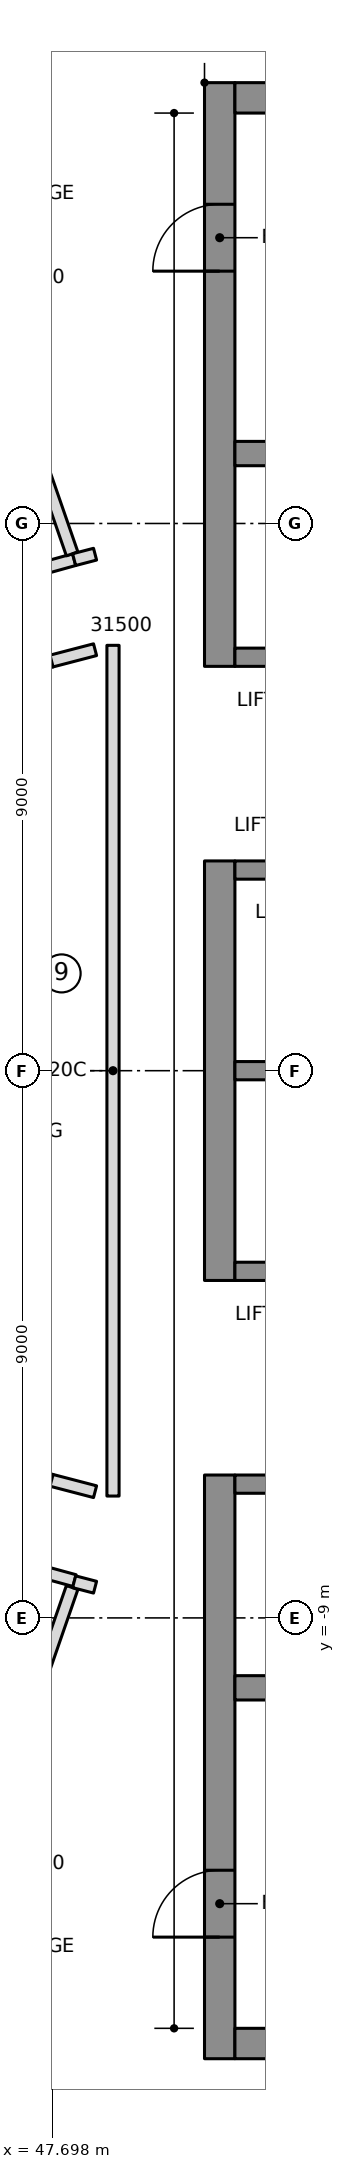
"""IFC4 building model, lengths in metres.
Left out: names, types, materials, properties, quantities, classifications, styles, units other than length and angle.
Written with IfcOpenShell. Run it as: python <this file> out.ifc"""

import sys

from ifc_helpers import new_model, si_unit, direction, frame, frame_2d, origin, place, context, subcontext, project, spatial, rectangle, extrude, element, fill, save


model = new_model("IFC4")
c1 = context("Model", 3, precision=1e-05, world=origin(), true_north=direction((0.0, 1.0)))
c2 = subcontext(c1, "Body", "Model", "MODEL_VIEW")
j1 = project(units=[si_unit("LENGTHUNIT", "METRE"), si_unit("PLANEANGLEUNIT", "RADIAN")], contexts=[c1])
p1 = place(None, origin())
s1 = spatial("IfcSite", under=j1, at=p1, CompositionType="ELEMENT")
p2 = place(p1, origin())
s2 = spatial("IfcBuilding", under=s1, at=p2, CompositionType="ELEMENT")
p3 = place(p2, frame((0.0, 0.0, 263.3)))
s3 = spatial("IfcBuildingStorey", under=s2, at=p3, CompositionType="ELEMENT", Elevation=263.3)
p4 = place(p3, frame((50.45, 6.65, 0.0), z_axis=(0.0, 0.0, 1.0), x_axis=(0.0, 1.0, 0.0)))
e1 = element("IfcWall", 1, at=p4, inside=s3, PredefinedType="SHEAR", context=c2, shape_type="SweptSolid", body=[
    extrude(rectangle(XDim=9.6, YDim=0.5, at=frame_2d((4.8, 0.0))), origin(), (0.0, 0.0, 1.0), 4.6),
])
p5 = place(p4, frame((6.5, 0.0, 0.0)))
e2 = element("IfcOpeningElement", 2, at=p5, cuts=e1, PredefinedType="OPENING", context=c2, shape_type="SweptSolid", body=[
    extrude(rectangle(XDim=1.1, YDim=2.1, at=frame_2d((0.55, 1.05))), frame((0.0, 0.26, 0.0), z_axis=(0.0, -1.0, 0.0), x_axis=(1.0, 0.0, 0.0)), (0.0, 0.0, 1.0), 0.52),
])
p6 = place(p3, frame((50.45, -3.45, 0.0), z_axis=(0.0, 0.0, 1.0), x_axis=(0.0, 1.0, 0.0)))
e3 = element("IfcWall", 3, at=p6, inside=s3, PredefinedType="SHEAR", context=c2, shape_type="SweptSolid", body=[
    extrude(rectangle(XDim=6.9, YDim=0.5, at=frame_2d((3.45, 0.0))), origin(), (0.0, 0.0, 1.0), 4.6),
])
p7 = place(p3, frame((50.45, -16.25, 0.0), z_axis=(0.0, 0.0, 1.0), x_axis=(0.0, 1.0, 0.0)))
e4 = element("IfcWall", 4, at=p7, inside=s3, PredefinedType="SHEAR", context=c2, shape_type="SweptSolid", body=[
    extrude(rectangle(XDim=9.6, YDim=0.5, at=frame_2d((4.8, 0.0))), origin(), (0.0, 0.0, 1.0), 4.6),
])
p8 = place(p7, frame((2.0, 0.0, 0.0)))
e5 = element("IfcOpeningElement", 5, at=p8, cuts=e4, PredefinedType="OPENING", context=c2, shape_type="SweptSolid", body=[
    extrude(rectangle(XDim=1.1, YDim=2.1, at=frame_2d((0.55, 1.05))), frame((0.0, 0.26, 0.0), z_axis=(0.0, -1.0, 0.0), x_axis=(1.0, 0.0, 0.0)), (0.0, 0.0, 1.0), 0.52),
])
for number, where, z_axis, x_axis in (
    (6, (50.7, 16.0, 0.0), (0.0, 0.0, 1.0), (1.0, 0.0, 0.0)),
    (7, (50.7, -16.0, 0.0), (0.0, 0.0, 1.0), (1.0, 0.0, 0.0)),
):
    element("IfcWall", number, at=place(p3, frame(where, z_axis=z_axis, x_axis=x_axis)), inside=s3, PredefinedType="SHEAR", context=c2, shape_type="SweptSolid", body=[
        extrude(rectangle(XDim=13.52, YDim=0.5, at=frame_2d((6.76, 0.0))), origin(), (0.0, 0.0, 1.0), 4.6),
    ])
p9 = place(p3, frame((50.7, 10.15, 0.0), z_axis=(0.0, 0.0, 1.0), x_axis=(1.0, 0.0, 0.0)))
e8 = element("IfcWall", 8, at=p9, inside=s3, PredefinedType="SHEAR", context=c2, shape_type="SweptSolid", body=[
    extrude(rectangle(XDim=13.02, YDim=0.4, at=frame_2d((6.51, 0.0))), origin(), (0.0, 0.0, 1.0), 4.6),
])
p10 = place(p9, frame((0.7, 0.0, 0.0)))
e9 = element("IfcOpeningElement", 9, at=p10, cuts=e8, PredefinedType="OPENING", context=c2, shape_type="SweptSolid", body=[
    extrude(rectangle(XDim=1.1, YDim=2.1, at=frame_2d((0.55, 1.05))), frame((0.0, 0.21, 0.0), z_axis=(0.0, -1.0, 0.0), x_axis=(1.0, 0.0, 0.0)), (0.0, 0.0, 1.0), 0.42),
])
p11 = place(p9, frame((3.5, 0.0, 0.0)))
e10 = element("IfcOpeningElement", 10, at=p11, cuts=e8, PredefinedType="OPENING", context=c2, shape_type="SweptSolid", body=[
    extrude(rectangle(XDim=1.1, YDim=2.1, at=frame_2d((0.55, 1.05))), frame((0.0, 0.21, 0.0), z_axis=(0.0, -1.0, 0.0), x_axis=(1.0, 0.0, 0.0)), (0.0, 0.0, 1.0), 0.42),
])
p12 = place(p3, frame((50.7, -10.15, 0.0), z_axis=(0.0, 0.0, 1.0), x_axis=(1.0, 0.0, 0.0)))
e11 = element("IfcWall", 11, at=p12, inside=s3, PredefinedType="SHEAR", context=c2, shape_type="SweptSolid", body=[
    extrude(rectangle(XDim=13.02, YDim=0.4, at=frame_2d((6.51, 0.0))), origin(), (0.0, 0.0, 1.0), 4.6),
])
p13 = place(p3, frame((50.7, 0.0, 0.0), z_axis=(0.0, 0.0, 1.0), x_axis=(1.0, 0.0, 0.0)))
e12 = element("IfcWall", 12, at=p13, inside=s3, PredefinedType="SHEAR", context=c2, shape_type="SweptSolid", body=[
    extrude(rectangle(XDim=10.9, YDim=0.3, at=frame_2d((5.45, 0.0))), origin(), (0.0, 0.0, 1.0), 4.6),
])
p14 = place(p3, frame((50.7, 3.3, 0.0), z_axis=(0.0, 0.0, 1.0), x_axis=(1.0, 0.0, 0.0)))
e13 = element("IfcWall", 13, at=p14, inside=s3, PredefinedType="SHEAR", context=c2, shape_type="SweptSolid", body=[
    extrude(rectangle(XDim=10.9, YDim=0.3, at=frame_2d((5.45, 0.0))), origin(), (0.0, 0.0, 1.0), 4.6),
])
p15 = place(p14, frame((0.7, 0.0, 0.0)))
e14 = element("IfcOpeningElement", 14, at=p15, cuts=e13, PredefinedType="OPENING", context=c2, shape_type="SweptSolid", body=[
    extrude(rectangle(XDim=1.1, YDim=2.1, at=frame_2d((0.55, 1.05))), frame((0.0, 0.16, 0.0), z_axis=(0.0, -1.0, 0.0), x_axis=(1.0, 0.0, 0.0)), (0.0, 0.0, 1.0), 0.32),
])
p16 = place(p14, frame((3.5, 0.0, 0.0)))
e15 = element("IfcOpeningElement", 15, at=p16, cuts=e13, PredefinedType="OPENING", context=c2, shape_type="SweptSolid", body=[
    extrude(rectangle(XDim=1.1, YDim=2.1, at=frame_2d((0.55, 1.05))), frame((0.0, 0.16, 0.0), z_axis=(0.0, -1.0, 0.0), x_axis=(1.0, 0.0, 0.0)), (0.0, 0.0, 1.0), 0.32),
])
p17 = place(p14, frame((6.4, 0.0, 0.0)))
e16 = element("IfcOpeningElement", 16, at=p17, cuts=e13, PredefinedType="OPENING", context=c2, shape_type="SweptSolid", body=[
    extrude(rectangle(XDim=0.9, YDim=2.1, at=frame_2d((0.45, 1.05))), frame((0.0, 0.16, 0.0), z_axis=(0.0, -1.0, 0.0), x_axis=(1.0, 0.0, 0.0)), (0.0, 0.0, 1.0), 0.32),
])
p18 = place(p14, frame((9.2, 0.0, 0.0)))
e17 = element("IfcOpeningElement", 17, at=p18, cuts=e13, PredefinedType="OPENING", context=c2, shape_type="SweptSolid", body=[
    extrude(rectangle(XDim=0.9, YDim=2.1, at=frame_2d((0.45, 1.05))), frame((0.0, 0.16, 0.0), z_axis=(0.0, -1.0, 0.0), x_axis=(1.0, 0.0, 0.0)), (0.0, 0.0, 1.0), 0.32),
])
p19 = place(p3, frame((50.7, 6.8, 0.0), z_axis=(0.0, 0.0, 1.0), x_axis=(1.0, 0.0, 0.0)))
e18 = element("IfcWall", 18, at=p19, inside=s3, PredefinedType="SHEAR", context=c2, shape_type="SweptSolid", body=[
    extrude(rectangle(XDim=10.9, YDim=0.3, at=frame_2d((5.45, 0.0))), origin(), (0.0, 0.0, 1.0), 4.6),
])
p20 = place(p19, frame((6.4, 0.0, 0.0)))
e19 = element("IfcOpeningElement", 19, at=p20, cuts=e18, PredefinedType="OPENING", context=c2, shape_type="SweptSolid", body=[
    extrude(rectangle(XDim=0.9, YDim=2.1, at=frame_2d((0.45, 1.05))), frame((0.0, 0.16, 0.0), z_axis=(0.0, -1.0, 0.0), x_axis=(1.0, 0.0, 0.0)), (0.0, 0.0, 1.0), 0.32),
])
p21 = place(p19, frame((9.2, 0.0, 0.0)))
e20 = element("IfcOpeningElement", 20, at=p21, cuts=e18, PredefinedType="OPENING", context=c2, shape_type="SweptSolid", body=[
    extrude(rectangle(XDim=0.9, YDim=2.1, at=frame_2d((0.45, 1.05))), frame((0.0, 0.16, 0.0), z_axis=(0.0, -1.0, 0.0), x_axis=(1.0, 0.0, 0.0)), (0.0, 0.0, 1.0), 0.32),
])
p22 = place(p3, frame((50.7, -3.3, 0.0), z_axis=(0.0, 0.0, 1.0), x_axis=(1.0, 0.0, 0.0)))
e21 = element("IfcWall", 21, at=p22, inside=s3, PredefinedType="SHEAR", context=c2, shape_type="SweptSolid", body=[
    extrude(rectangle(XDim=10.9, YDim=0.3, at=frame_2d((5.45, 0.0))), origin(), (0.0, 0.0, 1.0), 4.6),
])
p23 = place(p22, frame((9.1, 0.0, 0.0)))
e22 = element("IfcOpeningElement", 22, at=p23, cuts=e21, PredefinedType="OPENING", context=c2, shape_type="SweptSolid", body=[
    extrude(rectangle(XDim=1.1, YDim=2.1, at=frame_2d((0.55, 1.05))), frame((0.0, 0.16, 0.0), z_axis=(0.0, -1.0, 0.0), x_axis=(1.0, 0.0, 0.0)), (0.0, 0.0, 1.0), 0.32),
])
p24 = place(p3, frame((50.7, -6.8, 0.0), z_axis=(0.0, 0.0, 1.0), x_axis=(1.0, 0.0, 0.0)))
e23 = element("IfcWall", 23, at=p24, inside=s3, PredefinedType="SHEAR", context=c2, shape_type="SweptSolid", body=[
    extrude(rectangle(XDim=10.9, YDim=0.3, at=frame_2d((5.45, 0.0))), origin(), (0.0, 0.0, 1.0), 4.6),
])
p25 = place(p24, frame((6.3, 0.0, 0.0)))
e24 = element("IfcOpeningElement", 24, at=p25, cuts=e23, PredefinedType="OPENING", context=c2, shape_type="SweptSolid", body=[
    extrude(rectangle(XDim=1.1, YDim=2.1, at=frame_2d((0.55, 1.05))), frame((0.0, 0.16, 0.0), z_axis=(0.0, -1.0, 0.0), x_axis=(1.0, 0.0, 0.0)), (0.0, 0.0, 1.0), 0.32),
])
p26 = place(p24, frame((9.1, 0.0, 0.0)))
e25 = element("IfcOpeningElement", 25, at=p26, cuts=e23, PredefinedType="OPENING", context=c2, shape_type="SweptSolid", body=[
    extrude(rectangle(XDim=1.1, YDim=2.1, at=frame_2d((0.55, 1.05))), frame((0.0, 0.16, 0.0), z_axis=(0.0, -1.0, 0.0), x_axis=(1.0, 0.0, 0.0)), (0.0, 0.0, 1.0), 0.32),
])
p27 = place(p24, frame((0.8, 0.0, 0.0)))
e26 = element("IfcOpeningElement", 26, at=p27, cuts=e23, PredefinedType="OPENING", context=c2, shape_type="SweptSolid", body=[
    extrude(rectangle(XDim=0.9, YDim=2.1, at=frame_2d((0.45, 1.05))), frame((0.0, 0.16, 0.0), z_axis=(0.0, -1.0, 0.0), x_axis=(1.0, 0.0, 0.0)), (0.0, 0.0, 1.0), 0.32),
])
p28 = place(p24, frame((3.6, 0.0, 0.0)))
e27 = element("IfcOpeningElement", 27, at=p28, cuts=e23, PredefinedType="OPENING", context=c2, shape_type="SweptSolid", body=[
    extrude(rectangle(XDim=0.9, YDim=2.1, at=frame_2d((0.45, 1.05))), frame((0.0, 0.16, 0.0), z_axis=(0.0, -1.0, 0.0), x_axis=(1.0, 0.0, 0.0)), (0.0, 0.0, 1.0), 0.32),
])
p29 = place(p3, frame((48.056, 8.405, 0.0), z_axis=(0.0, 0.0, 1.0), x_axis=(-0.963429942227, -0.267960344866, 0.0)))
e28 = element("IfcWall", 28, at=p29, inside=s3, PredefinedType="PARTITIONING", context=c2, shape_type="SweptSolid", body=[
    extrude(rectangle(XDim=4.177, YDim=0.2, at=frame_2d((2.089, 0.0))), origin(), (0.0, 0.0, 1.0), 4.3),
])
p30 = place(p29, frame((1.35, 0.0, 0.0)))
e29 = element("IfcOpeningElement", 29, at=p30, cuts=e28, PredefinedType="OPENING", context=c2, shape_type="SweptSolid", body=[
    extrude(rectangle(XDim=1.0, YDim=2.1, at=frame_2d((0.5, 1.05))), frame((0.0, 0.11, 0.0), z_axis=(0.0, -1.0, 0.0), x_axis=(1.0, 0.0, 0.0)), (0.0, 0.0, 1.0), 0.22),
])
p31 = place(p3, frame((48.023, 8.5, 0.0), z_axis=(0.0, 0.0, 1.0), x_axis=(-0.327705598625, 0.944779890043, 0.0)))
e30 = element("IfcWall", 30, at=p31, inside=s3, PredefinedType="PARTITIONING", context=c2, shape_type="SweptSolid", body=[
    extrude(rectangle(XDim=9.61, YDim=0.2, at=frame_2d((4.805, 0.0))), origin(), (0.0, 0.0, 1.0), 4.3),
])
p32 = place(p3, frame((44.031, -7.286, 0.0), z_axis=(0.0, 0.0, 1.0), x_axis=(0.964708521199, -0.263320088726, 0.0)))
e31 = element("IfcWall", 31, at=p32, inside=s3, PredefinedType="PARTITIONING", context=c2, shape_type="SweptSolid", body=[
    extrude(rectangle(XDim=4.179, YDim=0.2, at=frame_2d((2.089, 0.0))), origin(), (0.0, 0.0, 1.0), 4.3),
])
p33 = place(p32, frame((1.8, 0.0, 0.0)))
e32 = element("IfcOpeningElement", 32, at=p33, cuts=e31, PredefinedType="OPENING", context=c2, shape_type="SweptSolid", body=[
    extrude(rectangle(XDim=1.0, YDim=2.1, at=frame_2d((0.5, 1.05))), frame((0.0, 0.11, 0.0), z_axis=(0.0, -1.0, 0.0), x_axis=(1.0, 0.0, 0.0)), (0.0, 0.0, 1.0), 0.22),
])
p34 = place(p3, frame((44.874, -17.579, 0.0), z_axis=(0.0, 0.0, 1.0), x_axis=(0.327705598625, 0.944779890043, 0.0)))
e33 = element("IfcWall", 33, at=p34, inside=s3, PredefinedType="PARTITIONING", context=c2, shape_type="SweptSolid", body=[
    extrude(rectangle(XDim=9.61, YDim=0.2, at=frame_2d((4.805, 0.0))), origin(), (0.0, 0.0, 1.0), 4.3),
])
p35 = place(p3, frame((47.684, -6.738, 0.0), z_axis=(0.0, 0.0, 1.0), x_axis=(-0.962403613575, 0.271623424206, 0.0)))
e34 = element("IfcWall", 34, at=p35, inside=s3, PredefinedType="PARTITIONING", context=c2, shape_type="SweptSolid", body=[
    extrude(rectangle(XDim=3.374, YDim=0.2, at=frame_2d((1.687, 0.0))), origin(), (0.0, 0.0, 1.0), 4.3),
])
p36 = place(p35, frame((1.187, 0.0, 0.0)))
e35 = element("IfcOpeningElement", 35, at=p36, cuts=e34, PredefinedType="OPENING", context=c2, shape_type="SweptSolid", body=[
    extrude(rectangle(XDim=1.0, YDim=2.1, at=frame_2d((0.5, 1.05))), frame((0.0, 0.11, 0.0), z_axis=(0.0, -1.0, 0.0), x_axis=(1.0, 0.0, 0.0)), (0.0, 0.0, 1.0), 0.22),
])
p37 = place(p3, frame((44.437, 5.821, 0.0), z_axis=(0.0, 0.0, 1.0), x_axis=(0.962403613575, 0.271623424206, 0.0)))
e36 = element("IfcWall", 36, at=p37, inside=s3, PredefinedType="PARTITIONING", context=c2, shape_type="SweptSolid", body=[
    extrude(rectangle(XDim=3.374, YDim=0.2, at=frame_2d((1.687, 0.0))), origin(), (0.0, 0.0, 1.0), 4.3),
])
for number, where, z_axis, x_axis in (
    (37, (48.4, 8.495, 0.0), (0.0, 0.0, 1.0), (-0.968, -0.253, 0.0)),
    (38, (48.056, -8.405, 0.0), (0.0, 0.0, 1.0), (0.968, -0.253, 0.0)),
):
    element("IfcWall", number, at=place(p3, frame(where, z_axis=z_axis, x_axis=x_axis)), inside=s3, PredefinedType="PARTITIONING", context=c2, shape_type="SweptSolid", body=[
        extrude(rectangle(XDim=0.355, YDim=0.2, at=frame_2d((0.178, 0.0))), origin(), (0.0, 0.0, 1.0), 4.3),
    ])
for number, where, z_axis, x_axis in (
    (39, (47.684, 6.738, 0.0), (0.0, 0.0, 1.0), (0.968, 0.253, 0.0)),
    (40, (48.4, -6.924, 0.0), (0.0, 0.0, 1.0), (-0.968, 0.253, 0.0)),
):
    element("IfcWall", number, at=place(p3, frame(where, z_axis=z_axis, x_axis=x_axis)), inside=s3, PredefinedType="PARTITIONING", context=c2, shape_type="SweptSolid", body=[
        extrude(rectangle(XDim=0.74, YDim=0.2, at=frame_2d((0.37, 0.0))), origin(), (0.0, 0.0, 1.0), 4.3),
    ])
p38 = place(p3, frame((48.695, 6.996, 0.0), z_axis=(0.0, 0.0, 1.0), x_axis=(0.0, -1.0, 0.0)))
e41 = element("IfcWall", 41, at=p38, inside=s3, PredefinedType="PARTITIONING", context=c2, shape_type="SweptSolid", body=[
    extrude(rectangle(XDim=13.992, YDim=0.2, at=frame_2d((6.996, 0.0))), origin(), (0.0, 0.0, 1.0), 4.3),
])
p39 = place(p5, origin())
e42 = element("IfcDoor", 42, at=p39, inside=s3, OperationType="SINGLE_SWING_RIGHT", PredefinedType="DOOR", context=c2, shape_type="SweptSolid", body=[
    extrude(rectangle(XDim=1.1, YDim=2.1, at=frame_2d((0.55, 1.05))), frame((0.0, 0.025, 0.0), z_axis=(0.0, -1.0, 0.0), x_axis=(1.0, 0.0, 0.0)), (0.0, 0.0, 1.0), 0.05),
])
fill(e2, e42)
p40 = place(p8, origin())
e43 = element("IfcDoor", 43, at=p40, inside=s3, OperationType="SINGLE_SWING_RIGHT", PredefinedType="DOOR", context=c2, shape_type="SweptSolid", body=[
    extrude(rectangle(XDim=1.1, YDim=2.1, at=frame_2d((0.55, 1.05))), frame((0.0, 0.025, 0.0), z_axis=(0.0, -1.0, 0.0), x_axis=(1.0, 0.0, 0.0)), (0.0, 0.0, 1.0), 0.05),
])
fill(e5, e43)
save(model, sys.argv[1])
